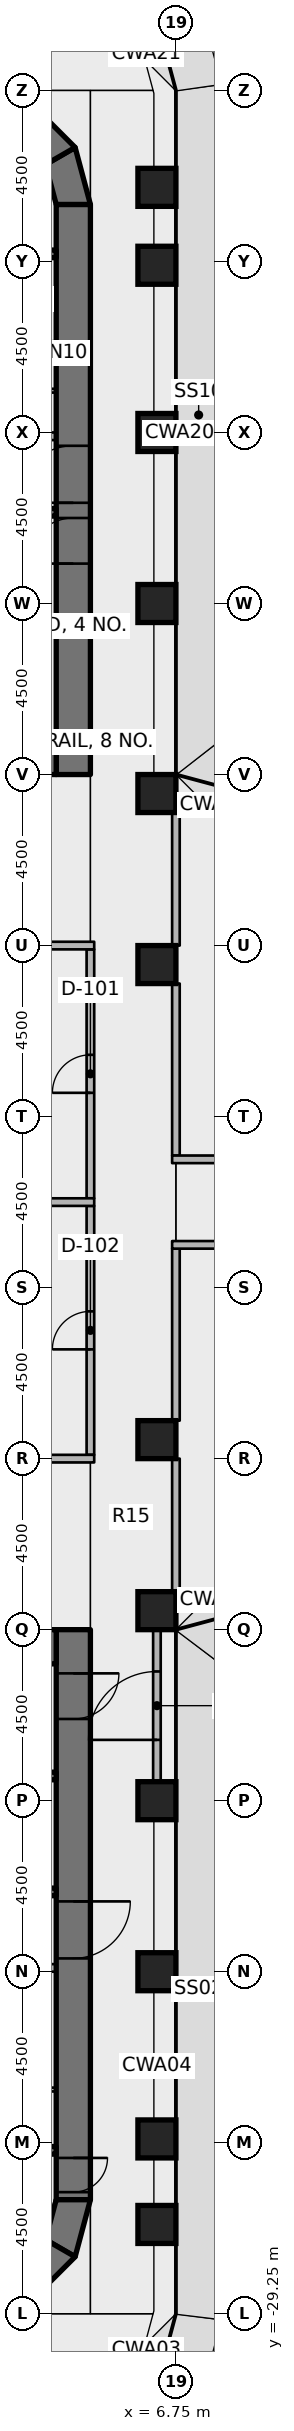
"""IFC4 building model, lengths in metres.
Left out: names, types, materials, properties, quantities, classifications, styles, units other than length and angle.
Written with IfcOpenShell. Run it as: python <this file> out.ifc"""

import sys

from ifc_helpers import new_model, si_unit, direction, frame, frame_2d, origin, origin_2d, place, context, subcontext, project, spatial, polyline, rectangle, outline, extrude, element, fill, save


model = new_model("IFC4")
c1 = context("Model", 3, precision=1e-05, world=origin(), true_north=direction((0.0, 1.0)))
c2 = subcontext(c1, "Body", "Model", "MODEL_VIEW")
j1 = project(units=[si_unit("LENGTHUNIT", "METRE"), si_unit("PLANEANGLEUNIT", "RADIAN")], contexts=[c1])
p1 = place(None, origin())
s1 = spatial("IfcSite", under=j1, at=p1, CompositionType="ELEMENT")
p2 = place(p1, origin())
s2 = spatial("IfcBuilding", under=s1, at=p2, CompositionType="ELEMENT")
p3 = place(p2, frame((0.0, 0.0, 27.0)))
s3 = spatial("IfcBuildingStorey", under=s2, at=p3, CompositionType="ELEMENT", Elevation=27.0)
for number, where, z_axis, x_axis in (
    (1, (6.25, -26.9, 0.0), (0.0, 0.0, 1.0), (1.0, 0.0, 0.0)),
    (2, (6.25, -24.65, 0.0), (0.0, 0.0, 1.0), (1.0, 0.0, 0.0)),
    (3, (6.25, -20.25, 0.0), (0.0, 0.0, 1.0), (1.0, 0.0, 0.0)),
    (4, (6.25, -15.75, 0.0), (0.0, 0.0, 1.0), (1.0, 0.0, 0.0)),
    (5, (6.25, -10.75, 0.0), (0.0, 0.0, 1.0), (1.0, 0.0, 0.0)),
    (6, (6.25, -6.25, 0.0), (0.0, 0.0, 1.0), (1.0, 0.0, 0.0)),
    (7, (6.25, 6.25, 0.0), (0.0, 0.0, 1.0), (1.0, 0.0, 0.0)),
    (8, (6.25, 10.75, 0.0), (0.0, 0.0, 1.0), (1.0, 0.0, 0.0)),
    (9, (6.25, 15.75, 0.0), (0.0, 0.0, 1.0), (1.0, 0.0, 0.0)),
    (10, (6.25, 20.25, 0.0), (0.0, 0.0, 1.0), (1.0, 0.0, 0.0)),
    (11, (6.25, 24.65, 0.0), (0.0, 0.0, 1.0), (1.0, 0.0, 0.0)),
    (12, (6.25, 26.7, 0.0), (0.0, 0.0, 1.0), (1.0, 0.0, 0.0)),
):
    element("IfcColumn", number, at=place(p3, frame(where, z_axis=z_axis, x_axis=x_axis)), inside=s3, PredefinedType="COLUMN", context=c2, shape_type="SweptSolid", body=[
        extrude(rectangle(XDim=1.0, YDim=1.0, at=origin_2d()), origin(), (0.0, 0.0, 1.0), 4.05),
    ])
p4 = place(p3, frame((4.05, 11.25, 0.0), z_axis=(0.0, 0.0, 1.0), x_axis=(0.0, 1.0, 0.0)))
e13 = element("IfcWall", 13, at=p4, inside=s3, PredefinedType="SHEAR", context=c2, shape_type="SweptSolid", body=[
    extrude(rectangle(XDim=15.0, YDim=0.9, at=frame_2d((7.5, 0.0))), origin(), (0.0, 0.0, 1.0), 4.2),
])
p5 = place(p4, frame((7.15, 0.0, 0.0)))
e14 = element("IfcOpeningElement", 14, at=p5, cuts=e13, PredefinedType="OPENING", context=c2, shape_type="SweptSolid", body=[
    extrude(rectangle(XDim=1.5, YDim=2.3, at=frame_2d((0.75, 1.15))), frame((0.0, 0.46, 0.0), z_axis=(0.0, -1.0, 0.0), x_axis=(1.0, 0.0, 0.0)), (0.0, 0.0, 1.0), 0.92),
])
p6 = place(p4, frame((5.55, 0.0, 0.0)))
e15 = element("IfcOpeningElement", 15, at=p6, cuts=e13, PredefinedType="OPENING", context=c2, shape_type="SweptSolid", body=[
    extrude(rectangle(XDim=1.2, YDim=2.1, at=frame_2d((0.6, 1.05))), frame((0.0, 0.46, 0.0), z_axis=(0.0, -1.0, 0.0), x_axis=(1.0, 0.0, 0.0)), (0.0, 0.0, 1.0), 0.92),
])
p7 = place(p3, frame((-3.6, 11.7, 0.0), z_axis=(0.0, 0.0, 1.0), x_axis=(1.0, 0.0, 0.0)))
e16 = element("IfcWall", 16, at=p7, inside=s3, PredefinedType="SHEAR", context=c2, shape_type="SweptSolid", body=[
    extrude(rectangle(XDim=7.2, YDim=0.9, at=frame_2d((3.6, 0.0))), origin(), (0.0, 0.0, 1.0), 4.2),
])
p8 = place(p3, origin())
e17 = element("IfcWall", 17, at=p8, inside=s3, PredefinedType="SHEAR", context=c2, shape_type="SweptSolid", body=[
    extrude(outline(polyline([(4.5, 26.25), (4.098, 27.75), (3.319, 27.3), (3.6, 26.25), (4.5, 26.25)])), origin(), (0.0, 0.0, 1.0), 4.2),
])
p9 = place(p3, origin())
e18 = element("IfcWall", 18, at=p9, inside=s3, PredefinedType="SHEAR", context=c2, shape_type="SweptSolid", body=[
    extrude(outline(polyline([(4.098, 27.75), (3.0, 28.848), (2.55, 28.069), (3.319, 27.3), (4.098, 27.75)])), origin(), (0.0, 0.0, 1.0), 4.2),
])
p10 = place(p3, frame((4.05, -11.25, 0.0), z_axis=(0.0, 0.0, 1.0), x_axis=(0.0, -1.0, 0.0)))
e19 = element("IfcWall", 19, at=p10, inside=s3, PredefinedType="SHEAR", context=c2, shape_type="SweptSolid", body=[
    extrude(rectangle(XDim=15.0, YDim=0.9, at=frame_2d((7.5, 0.0))), origin(), (0.0, 0.0, 1.0), 4.2),
])
p11 = place(p10, frame((7.15, 0.0, 0.0)))
e20 = element("IfcOpeningElement", 20, at=p11, cuts=e19, PredefinedType="OPENING", context=c2, shape_type="SweptSolid", body=[
    extrude(rectangle(XDim=1.5, YDim=2.3, at=frame_2d((0.75, 1.15))), frame((0.0, 0.46, 0.0), z_axis=(0.0, -1.0, 0.0), x_axis=(1.0, 0.0, 0.0)), (0.0, 0.0, 1.0), 0.92),
])
p12 = place(p10, frame((13.9, 0.0, 0.0)))
e21 = element("IfcOpeningElement", 21, at=p12, cuts=e19, PredefinedType="OPENING", context=c2, shape_type="SweptSolid", body=[
    extrude(rectangle(XDim=0.9, YDim=2.1, at=frame_2d((0.45, 1.05))), frame((0.0, 0.46, 0.0), z_axis=(0.0, -1.0, 0.0), x_axis=(1.0, 0.0, 0.0)), (0.0, 0.0, 1.0), 0.92),
])
p13 = place(p10, frame((1.15, 0.0, 0.0)))
e22 = element("IfcOpeningElement", 22, at=p13, cuts=e19, PredefinedType="OPENING", context=c2, shape_type="SweptSolid", body=[
    extrude(rectangle(XDim=1.2, YDim=2.1, at=frame_2d((0.6, 1.05))), frame((0.0, 0.46, 0.0), z_axis=(0.0, -1.0, 0.0), x_axis=(1.0, 0.0, 0.0)), (0.0, 0.0, 1.0), 0.92),
])
p14 = place(p3, frame((-3.6, -11.7, 0.0), z_axis=(0.0, 0.0, 1.0), x_axis=(1.0, 0.0, 0.0)))
e23 = element("IfcWall", 23, at=p14, inside=s3, PredefinedType="SHEAR", context=c2, shape_type="SweptSolid", body=[
    extrude(rectangle(XDim=7.2, YDim=0.9, at=frame_2d((3.6, 0.0))), origin(), (0.0, 0.0, 1.0), 4.2),
])
p15 = place(p3, origin())
e24 = element("IfcWall", 24, at=p15, inside=s3, PredefinedType="SHEAR", context=c2, shape_type="SweptSolid", body=[
    extrude(outline(polyline([(4.5, -26.25), (4.098, -27.75), (3.319, -27.3), (3.6, -26.25), (4.5, -26.25)])), origin(), (0.0, 0.0, 1.0), 4.2),
])
p16 = place(p3, origin())
e25 = element("IfcWall", 25, at=p16, inside=s3, PredefinedType="SHEAR", context=c2, shape_type="SweptSolid", body=[
    extrude(outline(polyline([(4.098, -27.75), (3.0, -28.848), (2.55, -28.069), (3.319, -27.3), (4.098, -27.75)])), origin(), (0.0, 0.0, 1.0), 4.2),
])
p17 = place(p3, frame((6.25, -15.25, 0.0), z_axis=(0.0, 0.0, 1.0), x_axis=(0.0, 1.0, 0.0)))
e26 = element("IfcWall", 26, at=p17, inside=s3, PredefinedType="SOLIDWALL", context=c2, shape_type="SweptSolid", body=[
    extrude(rectangle(XDim=4.0, YDim=0.2, at=frame_2d((2.0, 0.0))), origin(), (0.0, 0.0, 1.0), 3.15),
])
p18 = place(p17, frame((1.1, 0.0, 0.0)))
e27 = element("IfcOpeningElement", 27, at=p18, cuts=e26, PredefinedType="OPENING", context=c2, shape_type="SweptSolid", body=[
    extrude(rectangle(XDim=1.8, YDim=2.4, at=frame_2d((0.9, 1.2))), frame((0.0, 0.11, 0.0), z_axis=(0.0, -1.0, 0.0), x_axis=(1.0, 0.0, 0.0)), (0.0, 0.0, 1.0), 0.22),
])
for number, where, z_axis, x_axis in (
    (28, (-3.6, 24.95, 0.0), (0.0, 0.0, 1.0), (1.0, 0.0, 0.0)),
    (29, (-3.6, 18.15, 0.0), (0.0, 0.0, 1.0), (1.0, 0.0, 0.0)),
    (30, (-3.6, 15.1, 0.0), (0.0, 0.0, 1.0), (1.0, 0.0, 0.0)),
):
    element("IfcWall", number, at=place(p3, frame(where, z_axis=z_axis, x_axis=x_axis)), inside=s3, PredefinedType="SHEAR", context=c2, shape_type="SweptSolid", body=[
        extrude(rectangle(XDim=7.2, YDim=0.2, at=frame_2d((3.6, 0.0))), origin(), (0.0, 0.0, 1.0), 4.05),
    ])
p19 = place(p3, frame((0.9, 20.15, 0.0), z_axis=(0.0, 0.0, 1.0), x_axis=(1.0, 0.0, 0.0)))
e31 = element("IfcWall", 31, at=p19, inside=s3, PredefinedType="PARTITIONING", context=c2, shape_type="SweptSolid", body=[
    extrude(rectangle(XDim=2.7, YDim=0.2, at=frame_2d((1.35, 0.0))), origin(), (0.0, 0.0, 1.0), 4.05),
])
p20 = place(p3, frame((1.1, 22.55, 0.0), z_axis=(0.0, 0.0, 1.0), x_axis=(1.0, 0.0, 0.0)))
e32 = element("IfcWall", 32, at=p20, inside=s3, PredefinedType="PARTITIONING", context=c2, shape_type="SweptSolid", body=[
    extrude(rectangle(XDim=2.5, YDim=0.2, at=frame_2d((1.25, 0.0))), origin(), (0.0, 0.0, 1.0), 4.05),
])
p21 = place(p3, frame((1.1, 21.35, 0.0), z_axis=(0.0, 0.0, 1.0), x_axis=(1.0, 0.0, 0.0)))
e33 = element("IfcWall", 33, at=p21, inside=s3, PredefinedType="PARTITIONING", context=c2, shape_type="SweptSolid", body=[
    extrude(rectangle(XDim=2.5, YDim=0.1, at=frame_2d((1.25, 0.0))), origin(), (0.0, 0.0, 1.0), 4.05),
])
for number, where, z_axis, x_axis in (
    (34, (3.6, -24.95, 0.0), (0.0, 0.0, 1.0), (-1.0, 0.0, 0.0)),
    (35, (3.6, -18.15, 0.0), (0.0, 0.0, 1.0), (-1.0, 0.0, 0.0)),
    (36, (3.6, -15.1, 0.0), (0.0, 0.0, 1.0), (-1.0, 0.0, 0.0)),
):
    element("IfcWall", number, at=place(p3, frame(where, z_axis=z_axis, x_axis=x_axis)), inside=s3, PredefinedType="SHEAR", context=c2, shape_type="SweptSolid", body=[
        extrude(rectangle(XDim=7.2, YDim=0.2, at=frame_2d((3.6, 0.0))), origin(), (0.0, 0.0, 1.0), 4.05),
    ])
p22 = place(p3, frame((3.6, -20.15, 0.0), z_axis=(0.0, 0.0, 1.0), x_axis=(-1.0, 0.0, 0.0)))
e37 = element("IfcWall", 37, at=p22, inside=s3, PredefinedType="PARTITIONING", context=c2, shape_type="SweptSolid", body=[
    extrude(rectangle(XDim=2.7, YDim=0.2, at=frame_2d((1.35, 0.0))), origin(), (0.0, 0.0, 1.0), 4.05),
])
p23 = place(p3, frame((3.6, -23.35, 0.0), z_axis=(0.0, 0.0, 1.0), x_axis=(-1.0, 0.0, 0.0)))
e38 = element("IfcWall", 38, at=p23, inside=s3, PredefinedType="PARTITIONING", context=c2, shape_type="SweptSolid", body=[
    extrude(rectangle(XDim=2.5, YDim=0.1, at=frame_2d((1.25, 0.0))), origin(), (0.0, 0.0, 1.0), 4.05),
])
p24 = place(p3, frame((4.5, 0.1, 0.0), z_axis=(0.0, 0.0, 1.0), x_axis=(0.0, 1.0, 0.0)))
e39 = element("IfcWall", 39, at=p24, inside=s3, PredefinedType="PARTITIONING", context=c2, shape_type="SweptSolid", body=[
    extrude(rectangle(XDim=6.55, YDim=0.2, at=frame_2d((3.275, 0.0))), origin(), (0.0, 0.0, 1.0), 3.131),
])
p25 = place(p24, frame((2.775, 0.0, 0.0)))
e40 = element("IfcOpeningElement", 40, at=p25, cuts=e39, PredefinedType="OPENING", context=c2, shape_type="SweptSolid", body=[
    extrude(rectangle(XDim=1.0, YDim=2.1, at=frame_2d((0.5, 1.05))), frame((0.0, 0.11, 0.0), z_axis=(0.0, -1.0, 0.0), x_axis=(1.0, 0.0, 0.0)), (0.0, 0.0, 1.0), 0.22),
])
p26 = place(p3, frame((4.5, -6.65, 0.0), z_axis=(0.0, 0.0, 1.0), x_axis=(0.0, 1.0, 0.0)))
e41 = element("IfcWall", 41, at=p26, inside=s3, PredefinedType="PARTITIONING", context=c2, shape_type="SweptSolid", body=[
    extrude(rectangle(XDim=6.55, YDim=0.2, at=frame_2d((3.275, 0.0))), origin(), (0.0, 0.0, 1.0), 3.131),
])
p27 = place(p26, frame((2.775, 0.0, 0.0)))
e42 = element("IfcOpeningElement", 42, at=p27, cuts=e41, PredefinedType="OPENING", context=c2, shape_type="SweptSolid", body=[
    extrude(rectangle(XDim=1.0, YDim=2.1, at=frame_2d((0.5, 1.05))), frame((0.0, 0.11, 0.0), z_axis=(0.0, -1.0, 0.0), x_axis=(1.0, 0.0, 0.0)), (0.0, 0.0, 1.0), 0.22),
])
p28 = place(p3, frame((6.75, 1.225, 0.0), z_axis=(0.0, 0.0, 1.0), x_axis=(0.0, 1.0, 0.0)))
e43 = element("IfcWall", 43, at=p28, inside=s3, PredefinedType="PARTITIONING", context=c2, shape_type="SweptSolid", body=[
    extrude(rectangle(XDim=4.525, YDim=0.2, at=frame_2d((2.262, 0.0))), origin(), (0.0, 0.0, 1.0), 3.131),
])
for number, where, z_axis, x_axis in (
    (44, (6.75, 6.75, 0.0), (0.0, 0.0, 1.0), (0.0, 1.0, 0.0)),
    (45, (6.75, -10.25, 0.0), (0.0, 0.0, 1.0), (0.0, 1.0, 0.0)),
):
    element("IfcWall", number, at=place(p3, frame(where, z_axis=z_axis, x_axis=x_axis)), inside=s3, PredefinedType="PARTITIONING", context=c2, shape_type="SweptSolid", body=[
        extrude(rectangle(XDim=3.5, YDim=0.2, at=frame_2d((1.75, 0.0))), origin(), (0.0, 0.0, 1.0), 3.131),
    ])
p29 = place(p3, frame((6.75, -5.75, 0.0), z_axis=(0.0, 0.0, 1.0), x_axis=(0.0, 1.0, 0.0)))
e46 = element("IfcWall", 46, at=p29, inside=s3, PredefinedType="PARTITIONING", context=c2, shape_type="SweptSolid", body=[
    extrude(rectangle(XDim=4.525, YDim=0.2, at=frame_2d((2.262, 0.0))), origin(), (0.0, 0.0, 1.0), 3.131),
])
for number, where, z_axis, x_axis in (
    (47, (-0.1, 6.75, 0.0), (0.0, 0.0, 1.0), (1.0, 0.0, 0.0)),
    (48, (-0.1, -6.75, 0.0), (0.0, 0.0, 1.0), (1.0, 0.0, 0.0)),
    (49, (-0.1, 0.0, 0.0), (0.0, 0.0, 1.0), (1.0, 0.0, 0.0)),
):
    element("IfcWall", number, at=place(p3, frame(where, z_axis=z_axis, x_axis=x_axis)), inside=s3, PredefinedType="PARTITIONING", context=c2, shape_type="SweptSolid", body=[
        extrude(rectangle(XDim=4.7, YDim=0.2, at=frame_2d((2.35, 0.0))), origin(), (0.0, 0.0, 1.0), 3.131),
    ])
p30 = place(p3, frame((6.65, 1.125, 0.0), z_axis=(0.0, 0.0, 1.0), x_axis=(1.0, 0.0, 0.0)))
e50 = element("IfcWall", 50, at=p30, inside=s3, PredefinedType="PARTITIONING", context=c2, shape_type="SweptSolid", body=[
    extrude(rectangle(XDim=4.7, YDim=0.2, at=frame_2d((2.35, 0.0))), origin(), (0.0, 0.0, 1.0), 3.131),
])
p31 = place(p30, frame((1.85, 0.0, 0.0)))
e51 = element("IfcOpeningElement", 51, at=p31, cuts=e50, PredefinedType="OPENING", context=c2, shape_type="SweptSolid", body=[
    extrude(rectangle(XDim=1.0, YDim=2.1, at=frame_2d((0.5, 1.05))), frame((0.0, 0.11, 0.0), z_axis=(0.0, -1.0, 0.0), x_axis=(1.0, 0.0, 0.0)), (0.0, 0.0, 1.0), 0.22),
])
p32 = place(p3, frame((11.35, -1.125, 0.0), z_axis=(0.0, 0.0, 1.0), x_axis=(-1.0, 0.0, 0.0)))
e52 = element("IfcWall", 52, at=p32, inside=s3, PredefinedType="PARTITIONING", context=c2, shape_type="SweptSolid", body=[
    extrude(rectangle(XDim=4.7, YDim=0.2, at=frame_2d((2.35, 0.0))), origin(), (0.0, 0.0, 1.0), 3.131),
])
p33 = place(p32, frame((1.85, 0.0, 0.0)))
e53 = element("IfcOpeningElement", 53, at=p33, cuts=e52, PredefinedType="OPENING", context=c2, shape_type="SweptSolid", body=[
    extrude(rectangle(XDim=1.0, YDim=2.1, at=frame_2d((0.5, 1.05))), frame((0.0, 0.11, 0.0), z_axis=(0.0, -1.0, 0.0), x_axis=(1.0, 0.0, 0.0)), (0.0, 0.0, 1.0), 0.22),
])
p34 = place(p18, origin())
e54 = element("IfcDoor", 54, at=p34, inside=s3, OperationType="SINGLE_SWING_LEFT", PredefinedType="DOOR", context=c2, shape_type="SweptSolid", body=[
    extrude(rectangle(XDim=1.8, YDim=2.4, at=frame_2d((0.9, 1.2))), frame((0.0, 0.025, 0.0), z_axis=(0.0, -1.0, 0.0), x_axis=(1.0, 0.0, 0.0)), (0.0, 0.0, 1.0), 0.05),
])
fill(e27, e54)
p35 = place(p5, origin())
e55 = element("IfcDoor", 55, at=p35, inside=s3, OperationType="DOUBLE_DOOR_SINGLE_SWING", PredefinedType="DOOR", context=c2, shape_type="SweptSolid", body=[
    extrude(rectangle(XDim=1.5, YDim=2.3, at=frame_2d((0.75, 1.15))), frame((0.0, 0.025, 0.0), z_axis=(0.0, -1.0, 0.0), x_axis=(1.0, 0.0, 0.0)), (0.0, 0.0, 1.0), 0.05),
])
fill(e14, e55)
p36 = place(p6, origin())
e56 = element("IfcDoor", 56, at=p36, inside=s3, OperationType="SINGLE_SWING_LEFT", PredefinedType="DOOR", context=c2, shape_type="SweptSolid", body=[
    extrude(rectangle(XDim=1.2, YDim=2.1, at=frame_2d((0.6, 1.05))), frame((0.0, 0.025, 0.0), z_axis=(0.0, -1.0, 0.0), x_axis=(1.0, 0.0, 0.0)), (0.0, 0.0, 1.0), 0.05),
])
fill(e15, e56)
p37 = place(p11, origin())
e57 = element("IfcDoor", 57, at=p37, inside=s3, OperationType="DOUBLE_DOOR_SINGLE_SWING", PredefinedType="DOOR", context=c2, shape_type="SweptSolid", body=[
    extrude(rectangle(XDim=1.5, YDim=2.3, at=frame_2d((0.75, 1.15))), frame((0.0, 0.025, 0.0), z_axis=(0.0, -1.0, 0.0), x_axis=(1.0, 0.0, 0.0)), (0.0, 0.0, 1.0), 0.05),
])
fill(e20, e57)
p38 = place(p12, origin())
e58 = element("IfcDoor", 58, at=p38, inside=s3, OperationType="SINGLE_SWING_LEFT", PredefinedType="DOOR", context=c2, shape_type="SweptSolid", body=[
    extrude(rectangle(XDim=0.9, YDim=2.1, at=frame_2d((0.45, 1.05))), frame((0.0, 0.025, 0.0), z_axis=(0.0, -1.0, 0.0), x_axis=(1.0, 0.0, 0.0)), (0.0, 0.0, 1.0), 0.05),
])
fill(e21, e58)
p39 = place(p13, origin())
e59 = element("IfcDoor", 59, at=p39, inside=s3, OperationType="SINGLE_SWING_LEFT", PredefinedType="DOOR", context=c2, shape_type="SweptSolid", body=[
    extrude(rectangle(XDim=1.2, YDim=2.1, at=frame_2d((0.6, 1.05))), frame((0.0, 0.025, 0.0), z_axis=(0.0, -1.0, 0.0), x_axis=(1.0, 0.0, 0.0)), (0.0, 0.0, 1.0), 0.05),
])
fill(e22, e59)
p40 = place(p25, origin())
e60 = element("IfcDoor", 60, at=p40, inside=s3, OperationType="SINGLE_SWING_LEFT", PredefinedType="DOOR", context=c2, shape_type="SweptSolid", body=[
    extrude(rectangle(XDim=1.0, YDim=2.1, at=frame_2d((0.5, 1.05))), frame((0.0, 0.025, 0.0), z_axis=(0.0, -1.0, 0.0), x_axis=(1.0, 0.0, 0.0)), (0.0, 0.0, 1.0), 0.05),
])
fill(e40, e60)
p41 = place(p27, origin())
e61 = element("IfcDoor", 61, at=p41, inside=s3, OperationType="SINGLE_SWING_RIGHT", PredefinedType="DOOR", context=c2, shape_type="SweptSolid", body=[
    extrude(rectangle(XDim=1.0, YDim=2.1, at=frame_2d((0.5, 1.05))), frame((0.0, 0.025, 0.0), z_axis=(0.0, -1.0, 0.0), x_axis=(1.0, 0.0, 0.0)), (0.0, 0.0, 1.0), 0.05),
])
fill(e42, e61)
save(model, sys.argv[1])
